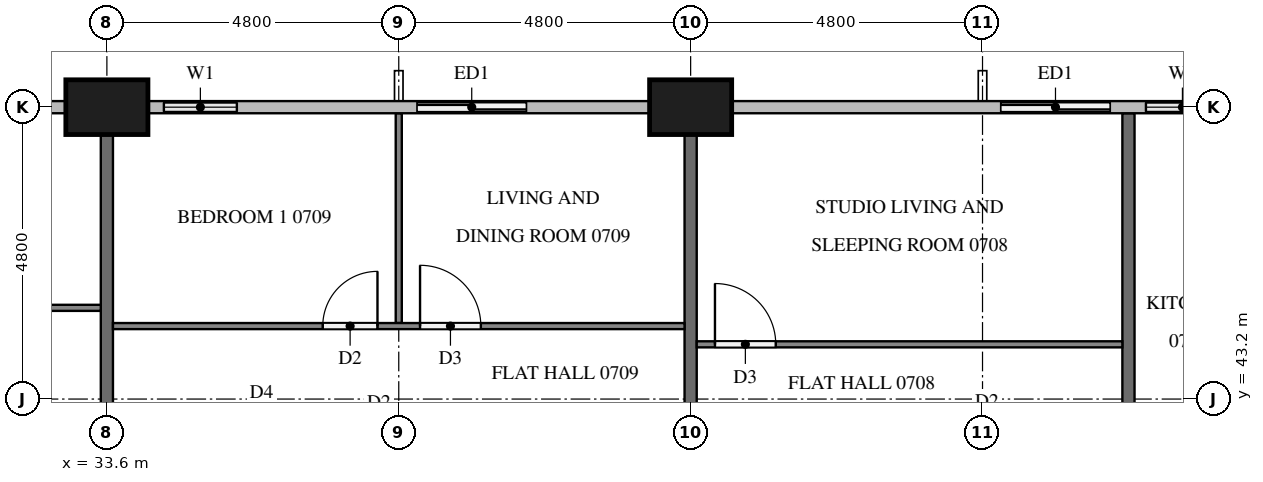
"""IFC4 building model, lengths in metres.
Left out: names, types, materials, properties, quantities, classifications, styles, units other than length and angle.
Written with IfcOpenShell. Run it as: python <this file> out.ifc"""

import sys

from ifc_helpers import new_model, si_unit, direction, frame, frame_2d, origin, origin_2d, place, context, subcontext, project, spatial, rectangle, extrude, element, fill, save


model = new_model("IFC4")
c1 = context("Model", 3, precision=1e-05, world=origin(), true_north=direction((0.0, 1.0)))
c2 = subcontext(c1, "Body", "Model", "MODEL_VIEW")
j1 = project(units=[si_unit("LENGTHUNIT", "METRE"), si_unit("PLANEANGLEUNIT", "RADIAN")], contexts=[c1])
p1 = place(None, origin())
s1 = spatial("IfcSite", under=j1, at=p1, CompositionType="ELEMENT")
p2 = place(p1, origin())
s2 = spatial("IfcBuilding", under=s1, at=p2, CompositionType="ELEMENT")
p3 = place(p2, frame((0.0, 0.0, 32.9)))
s3 = spatial("IfcBuildingStorey", under=s2, at=p3, CompositionType="ELEMENT", Elevation=32.9)
for number, where, z_axis, x_axis in (
    (1, (43.2, 48.0, 0.0), (0.0, 0.0, 1.0), (1.0, 0.0, 0.0)),
    (2, (33.6, 48.0, 0.0), (0.0, 0.0, 1.0), (1.0, 0.0, 0.0)),
):
    element("IfcColumn", number, at=place(p3, frame(where, z_axis=z_axis, x_axis=x_axis)), inside=s3, PredefinedType="COLUMN", context=c2, shape_type="SweptSolid", body=[
        extrude(rectangle(XDim=1.35, YDim=0.9, at=origin_2d()), origin(), (0.0, 0.0, 1.0), 3.2),
    ])
p4 = place(p3, frame((52.175, 48.0, 0.0), z_axis=(0.0, 0.0, 1.0), x_axis=(-1.0, 0.0, 0.0)))
e3 = element("IfcWall", 3, at=p4, inside=s3, PredefinedType="SOLIDWALL", context=c2, shape_type="SweptSolid", body=[
    extrude(rectangle(XDim=4.175, YDim=0.15, at=frame_2d((2.087, 0.0))), origin(), (0.0, 0.0, 1.0), 3.2),
])
p5 = place(p4, frame((0.288, 0.0, 0.9)))
e4 = element("IfcOpeningElement", 4, at=p5, cuts=e3, PredefinedType="OPENING", context=c2, shape_type="SweptSolid", body=[
    extrude(rectangle(XDim=1.2, YDim=1.4, at=frame_2d((0.6, 0.7))), frame((0.0, 0.085, 0.0), z_axis=(0.0, -1.0, 0.0), x_axis=(1.0, 0.0, 0.0)), (0.0, 0.0, 1.0), 0.17),
])
p6 = place(p4, frame((2.075, 0.0, 0.0)))
e5 = element("IfcOpeningElement", 5, at=p6, cuts=e3, PredefinedType="OPENING", context=c2, shape_type="SweptSolid", body=[
    extrude(rectangle(XDim=1.8, YDim=2.4, at=frame_2d((0.9, 1.2))), frame((0.0, 0.085, 0.0), z_axis=(0.0, -1.0, 0.0), x_axis=(1.0, 0.0, 0.0)), (0.0, 0.0, 1.0), 0.17),
])
p7 = place(p3, frame((40.8, 48.0, 0.0), z_axis=(0.0, 0.0, 1.0), x_axis=(-1.0, 0.0, 0.0)))
e6 = element("IfcWall", 6, at=p7, inside=s3, PredefinedType="SOLIDWALL", context=c2, shape_type="SweptSolid", body=[
    extrude(rectangle(XDim=2.4, YDim=0.15, at=frame_2d((1.2, 0.0))), origin(), (0.0, 0.0, 1.0), 3.2),
])
p8 = place(p7, frame((0.3, 0.0, 0.0)))
e7 = element("IfcOpeningElement", 7, at=p8, cuts=e6, PredefinedType="OPENING", context=c2, shape_type="SweptSolid", body=[
    extrude(rectangle(XDim=1.8, YDim=2.4, at=frame_2d((0.9, 1.2))), frame((0.0, 0.085, 0.0), z_axis=(0.0, -1.0, 0.0), x_axis=(1.0, 0.0, 0.0)), (0.0, 0.0, 1.0), 0.17),
])
p9 = place(p3, frame((36.0, 48.0, 0.0), z_axis=(0.0, 0.0, 1.0), x_axis=(-1.0, 0.0, 0.0)))
e8 = element("IfcWall", 8, at=p9, inside=s3, PredefinedType="SOLIDWALL", context=c2, shape_type="SweptSolid", body=[
    extrude(rectangle(XDim=1.725, YDim=0.15, at=frame_2d((0.863, 0.0))), origin(), (0.0, 0.0, 1.0), 3.2),
])
p10 = place(p9, frame((0.262, 0.0, 0.9)))
e9 = element("IfcOpeningElement", 9, at=p10, cuts=e8, PredefinedType="OPENING", context=c2, shape_type="SweptSolid", body=[
    extrude(rectangle(XDim=1.2, YDim=1.4, at=frame_2d((0.6, 0.7))), frame((0.0, 0.085, 0.0), z_axis=(0.0, -1.0, 0.0), x_axis=(1.0, 0.0, 0.0)), (0.0, 0.0, 1.0), 0.17),
])
p11 = place(p3, frame((32.925, 48.0, 0.0), z_axis=(0.0, 0.0, 1.0), x_axis=(-1.0, 0.0, 0.0)))
e10 = element("IfcWall", 10, at=p11, inside=s3, PredefinedType="SOLIDWALL", context=c2, shape_type="SweptSolid", body=[
    extrude(rectangle(XDim=1.725, YDim=0.15, at=frame_2d((0.863, 0.0))), origin(), (0.0, 0.0, 1.0), 3.2),
])
p12 = place(p11, frame((0.262, 0.0, 0.9)))
e11 = element("IfcOpeningElement", 11, at=p12, cuts=e10, PredefinedType="OPENING", context=c2, shape_type="SweptSolid", body=[
    extrude(rectangle(XDim=1.2, YDim=1.4, at=frame_2d((0.6, 0.7))), frame((0.0, 0.085, 0.0), z_axis=(0.0, -1.0, 0.0), x_axis=(1.0, 0.0, 0.0)), (0.0, 0.0, 1.0), 0.17),
])
p13 = place(p3, frame((50.4, 40.9, 0.0), z_axis=(0.0, 0.0, 1.0), x_axis=(0.0, 1.0, 0.0)))
e12 = element("IfcWall", 12, at=p13, inside=s3, PredefinedType="PARTITIONING", context=c2, shape_type="SweptSolid", body=[
    extrude(rectangle(XDim=7.0, YDim=0.2, at=frame_2d((3.5, 0.0))), origin(), (0.0, 0.0, 1.0), 3.2),
])
for number, where, z_axis, x_axis in (
    (13, (43.2, 47.55, 0.0), (0.0, 0.0, 1.0), (0.0, -1.0, 0.0)),
    (14, (33.6, 47.55, 0.0), (0.0, 0.0, 1.0), (0.0, -1.0, 0.0)),
):
    element("IfcWall", number, at=place(p3, frame(where, z_axis=z_axis, x_axis=x_axis)), inside=s3, PredefinedType="PARTITIONING", context=c2, shape_type="SweptSolid", body=[
        extrude(rectangle(XDim=6.65, YDim=0.2, at=frame_2d((3.325, 0.0))), origin(), (0.0, 0.0, 1.0), 3.2),
    ])
p14 = place(p3, frame((43.3, 44.1, 0.0), z_axis=(0.0, 0.0, 1.0), x_axis=(1.0, 0.0, 0.0)))
e15 = element("IfcWall", 15, at=p14, inside=s3, PredefinedType="PARTITIONING", context=c2, shape_type="SweptSolid", body=[
    extrude(rectangle(XDim=7.0, YDim=0.1, at=frame_2d((3.5, 0.0))), origin(), (0.0, 0.0, 1.0), 3.2),
])
p15 = place(p14, frame((0.3, 0.0, 0.0)))
e16 = element("IfcOpeningElement", 16, at=p15, cuts=e15, PredefinedType="OPENING", context=c2, shape_type="SweptSolid", body=[
    extrude(rectangle(XDim=1.0, YDim=2.1, at=frame_2d((0.5, 1.05))), frame((0.0, 0.06, 0.0), z_axis=(0.0, -1.0, 0.0), x_axis=(1.0, 0.0, 0.0)), (0.0, 0.0, 1.0), 0.12),
])
p16 = place(p3, frame((38.4, 44.45, 0.0), z_axis=(0.0, 0.0, 1.0), x_axis=(0.0, 1.0, 0.0)))
e17 = element("IfcWall", 17, at=p16, inside=s3, PredefinedType="PARTITIONING", context=c2, shape_type="SweptSolid", body=[
    extrude(rectangle(XDim=3.45, YDim=0.1, at=frame_2d((1.725, 0.0))), origin(), (0.0, 0.0, 1.0), 3.2),
])
p17 = place(p3, frame((33.7, 44.4, 0.0), z_axis=(0.0, 0.0, 1.0), x_axis=(1.0, 0.0, 0.0)))
e18 = element("IfcWall", 18, at=p17, inside=s3, PredefinedType="PARTITIONING", context=c2, shape_type="SweptSolid", body=[
    extrude(rectangle(XDim=9.4, YDim=0.1, at=frame_2d((4.7, 0.0))), origin(), (0.0, 0.0, 1.0), 3.2),
])
p18 = place(p17, frame((5.05, 0.0, 0.0)))
e19 = element("IfcOpeningElement", 19, at=p18, cuts=e18, PredefinedType="OPENING", context=c2, shape_type="SweptSolid", body=[
    extrude(rectangle(XDim=1.0, YDim=2.1, at=frame_2d((0.5, 1.05))), frame((0.0, 0.06, 0.0), z_axis=(0.0, -1.0, 0.0), x_axis=(1.0, 0.0, 0.0)), (0.0, 0.0, 1.0), 0.12),
])
p19 = place(p17, frame((3.45, 0.0, 0.0)))
e20 = element("IfcOpeningElement", 20, at=p19, cuts=e18, PredefinedType="OPENING", context=c2, shape_type="SweptSolid", body=[
    extrude(rectangle(XDim=0.9, YDim=2.1, at=frame_2d((0.45, 1.05))), frame((0.0, 0.06, 0.0), z_axis=(0.0, -1.0, 0.0), x_axis=(1.0, 0.0, 0.0)), (0.0, 0.0, 1.0), 0.12),
])
p20 = place(p3, frame((14.5, 44.7, 0.0), z_axis=(0.0, 0.0, 1.0), x_axis=(1.0, 0.0, 0.0)))
e21 = element("IfcWall", 21, at=p20, inside=s3, PredefinedType="PARTITIONING", context=c2, shape_type="SweptSolid", body=[
    extrude(rectangle(XDim=19.0, YDim=0.1, at=frame_2d((9.5, 0.0))), origin(), (0.0, 0.0, 1.0), 3.2),
])
p21 = place(p20, frame((3.45, 0.0, 0.0)))
e22 = element("IfcOpeningElement", 22, at=p21, cuts=e21, PredefinedType="OPENING", context=c2, shape_type="SweptSolid", body=[
    extrude(rectangle(XDim=0.9, YDim=2.1, at=frame_2d((0.45, 1.05))), frame((0.0, 0.06, 0.0), z_axis=(0.0, -1.0, 0.0), x_axis=(1.0, 0.0, 0.0)), (0.0, 0.0, 1.0), 0.12),
])
p22 = place(p20, frame((5.05, 0.0, 0.0)))
e23 = element("IfcOpeningElement", 23, at=p22, cuts=e21, PredefinedType="OPENING", context=c2, shape_type="SweptSolid", body=[
    extrude(rectangle(XDim=0.9, YDim=2.1, at=frame_2d((0.45, 1.05))), frame((0.0, 0.06, 0.0), z_axis=(0.0, -1.0, 0.0), x_axis=(1.0, 0.0, 0.0)), (0.0, 0.0, 1.0), 0.12),
])
p23 = place(p20, frame((12.95, 0.0, 0.0)))
e24 = element("IfcOpeningElement", 24, at=p23, cuts=e21, PredefinedType="OPENING", context=c2, shape_type="SweptSolid", body=[
    extrude(rectangle(XDim=1.0, YDim=2.1, at=frame_2d((0.5, 1.05))), frame((0.0, 0.06, 0.0), z_axis=(0.0, -1.0, 0.0), x_axis=(1.0, 0.0, 0.0)), (0.0, 0.0, 1.0), 0.12),
])
p24 = place(p20, frame((14.65, 0.0, 0.0)))
e25 = element("IfcOpeningElement", 25, at=p24, cuts=e21, PredefinedType="OPENING", context=c2, shape_type="SweptSolid", body=[
    extrude(rectangle(XDim=0.9, YDim=2.1, at=frame_2d((0.45, 1.05))), frame((0.0, 0.06, 0.0), z_axis=(0.0, -1.0, 0.0), x_axis=(1.0, 0.0, 0.0)), (0.0, 0.0, 1.0), 0.12),
])
p25 = place(p5, origin())
e26 = element("IfcWindow", 26, at=p25, inside=s3, PartitioningType="SINGLE_PANEL", PredefinedType="WINDOW", context=c2, shape_type="SweptSolid", body=[
    extrude(rectangle(XDim=1.2, YDim=1.4, at=frame_2d((0.6, 0.7))), frame((0.0, 0.03, 0.0), z_axis=(0.0, -1.0, 0.0), x_axis=(1.0, 0.0, 0.0)), (0.0, 0.0, 1.0), 0.06),
])
fill(e4, e26)
p26 = place(p6, origin())
e27 = element("IfcDoor", 27, at=p26, inside=s3, OperationType="SLIDING_TO_LEFT", PredefinedType="DOOR", context=c2, shape_type="SweptSolid", body=[
    extrude(rectangle(XDim=1.8, YDim=2.4, at=frame_2d((0.9, 1.2))), frame((0.0, 0.025, 0.0), z_axis=(0.0, -1.0, 0.0), x_axis=(1.0, 0.0, 0.0)), (0.0, 0.0, 1.0), 0.05),
])
fill(e5, e27)
p27 = place(p8, origin())
e28 = element("IfcDoor", 28, at=p27, inside=s3, OperationType="SLIDING_TO_RIGHT", PredefinedType="DOOR", context=c2, shape_type="SweptSolid", body=[
    extrude(rectangle(XDim=1.8, YDim=2.4, at=frame_2d((0.9, 1.2))), frame((0.0, 0.025, 0.0), z_axis=(0.0, -1.0, 0.0), x_axis=(1.0, 0.0, 0.0)), (0.0, 0.0, 1.0), 0.05),
])
fill(e7, e28)
p28 = place(p10, origin())
e29 = element("IfcWindow", 29, at=p28, inside=s3, PartitioningType="SINGLE_PANEL", PredefinedType="WINDOW", context=c2, shape_type="SweptSolid", body=[
    extrude(rectangle(XDim=1.2, YDim=1.4, at=frame_2d((0.6, 0.7))), frame((0.0, 0.03, 0.0), z_axis=(0.0, -1.0, 0.0), x_axis=(1.0, 0.0, 0.0)), (0.0, 0.0, 1.0), 0.06),
])
fill(e9, e29)
p29 = place(p15, origin())
e30 = element("IfcDoor", 30, at=p29, inside=s3, OperationType="SINGLE_SWING_LEFT", PredefinedType="DOOR", context=c2, shape_type="SweptSolid", body=[
    extrude(rectangle(XDim=1.0, YDim=2.1, at=frame_2d((0.5, 1.05))), frame((0.0, 0.025, 0.0), z_axis=(0.0, -1.0, 0.0), x_axis=(1.0, 0.0, 0.0)), (0.0, 0.0, 1.0), 0.05),
])
fill(e16, e30)
p30 = place(p18, origin())
e31 = element("IfcDoor", 31, at=p30, inside=s3, OperationType="SINGLE_SWING_LEFT", PredefinedType="DOOR", context=c2, shape_type="SweptSolid", body=[
    extrude(rectangle(XDim=1.0, YDim=2.1, at=frame_2d((0.5, 1.05))), frame((0.0, 0.025, 0.0), z_axis=(0.0, -1.0, 0.0), x_axis=(1.0, 0.0, 0.0)), (0.0, 0.0, 1.0), 0.05),
])
fill(e19, e31)
p31 = place(p19, origin())
e32 = element("IfcDoor", 32, at=p31, inside=s3, OperationType="SINGLE_SWING_RIGHT", PredefinedType="DOOR", context=c2, shape_type="SweptSolid", body=[
    extrude(rectangle(XDim=0.9, YDim=2.1, at=frame_2d((0.45, 1.05))), frame((0.0, 0.025, 0.0), z_axis=(0.0, -1.0, 0.0), x_axis=(1.0, 0.0, 0.0)), (0.0, 0.0, 1.0), 0.05),
])
fill(e20, e32)
save(model, sys.argv[1])
